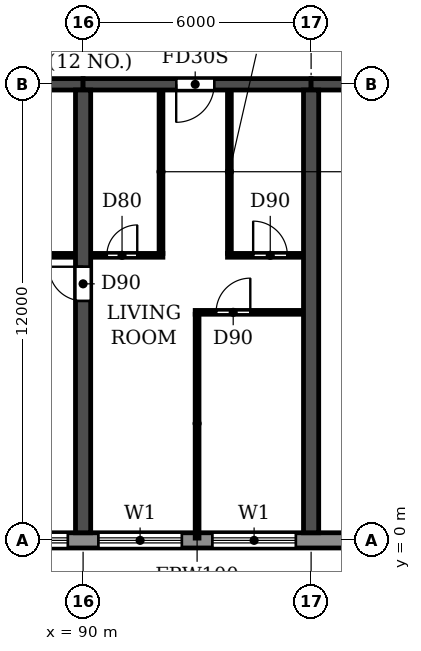
"""IFC4 building model, lengths in metres.
Left out: names, types, materials, properties, quantities, classifications, styles, units other than length and angle.
Written with IfcOpenShell. Run it as: python <this file> out.ifc"""

import sys

from ifc_helpers import new_model, si_unit, direction, frame, frame_2d, origin, place, context, subcontext, project, spatial, rectangle, extrude, element, fill, save


model = new_model("IFC4")
c1 = context("Model", 3, precision=1e-05, world=origin(), true_north=direction((0.0, 1.0)))
c2 = subcontext(c1, "Body", "Model", "MODEL_VIEW")
j1 = project(units=[si_unit("LENGTHUNIT", "METRE"), si_unit("PLANEANGLEUNIT", "RADIAN")], contexts=[c1])
p1 = place(None, origin())
s1 = spatial("IfcSite", under=j1, at=p1, CompositionType="ELEMENT")
p2 = place(p1, origin())
s2 = spatial("IfcBuilding", under=s1, at=p2, CompositionType="ELEMENT")
p3 = place(p2, frame((0.0, 0.0, 26.7)))
s3 = spatial("IfcBuildingStorey", under=s2, at=p3, CompositionType="ELEMENT", Elevation=26.7)
p4 = place(p3, frame((90.0, 0.2, 0.0), z_axis=(0.0, 0.0, 1.0), x_axis=(0.0, 1.0, 0.0)))
e1 = element("IfcWall", 1, at=p4, inside=s3, PredefinedType="SHEAR", context=c2, shape_type="SweptSolid", body=[
    extrude(rectangle(XDim=11.65, YDim=0.4, at=frame_2d((5.825, 0.0))), origin(), (0.0, 0.0, 1.0), 3.05),
])
p5 = place(p4, frame((6.1, 0.0, 0.0)))
e2 = element("IfcOpeningElement", 2, at=p5, cuts=e1, PredefinedType="OPENING", context=c2, shape_type="SweptSolid", body=[
    extrude(rectangle(XDim=0.9, YDim=2.1, at=frame_2d((0.45, 1.05))), frame((0.0, 0.21, 0.0), z_axis=(0.0, -1.0, 0.0), x_axis=(1.0, 0.0, 0.0)), (0.0, 0.0, 1.0), 0.42),
])
p6 = place(p3, frame((96.0, 0.2, 0.0), z_axis=(0.0, 0.0, 1.0), x_axis=(0.0, 1.0, 0.0)))
e3 = element("IfcWall", 3, at=p6, inside=s3, PredefinedType="SHEAR", context=c2, shape_type="SweptSolid", body=[
    extrude(rectangle(XDim=11.65, YDim=0.4, at=frame_2d((5.825, 0.0))), origin(), (0.0, 0.0, 1.0), 3.05),
])
p7 = place(p3, frame((84.0, 12.0, 0.0), z_axis=(0.0, 0.0, 1.0), x_axis=(1.0, 0.0, 0.0)))
e4 = element("IfcWall", 4, at=p7, inside=s3, PredefinedType="SHEAR", context=c2, shape_type="SweptSolid", body=[
    extrude(rectangle(XDim=6.0, YDim=0.3, at=frame_2d((3.0, 0.0))), origin(), (0.0, 0.0, 1.0), 2.45),
])
p8 = place(p3, frame((90.0, 12.0, 0.0), z_axis=(0.0, 0.0, 1.0), x_axis=(1.0, 0.0, 0.0)))
e5 = element("IfcWall", 5, at=p8, inside=s3, PredefinedType="SHEAR", context=c2, shape_type="SweptSolid", body=[
    extrude(rectangle(XDim=6.0, YDim=0.3, at=frame_2d((3.0, 0.0))), origin(), (0.0, 0.0, 1.0), 2.45),
])
p9 = place(p8, frame((2.45, 0.0, 0.0)))
e6 = element("IfcOpeningElement", 6, at=p9, cuts=e5, PredefinedType="OPENING", context=c2, shape_type="SweptSolid", body=[
    extrude(rectangle(XDim=1.0, YDim=2.1, at=frame_2d((0.5, 1.05))), frame((0.0, 0.16, 0.0), z_axis=(0.0, -1.0, 0.0), x_axis=(1.0, 0.0, 0.0)), (0.0, 0.0, 1.0), 0.32),
])
p10 = place(p3, frame((96.0, 12.0, 0.0), z_axis=(0.0, 0.0, 1.0), x_axis=(1.0, 0.0, 0.0)))
e7 = element("IfcWall", 7, at=p10, inside=s3, PredefinedType="SHEAR", context=c2, shape_type="SweptSolid", body=[
    extrude(rectangle(XDim=5.8, YDim=0.3, at=frame_2d((2.9, 0.0))), origin(), (0.0, 0.0, 1.0), 2.45),
])
p11 = place(p10, frame((2.5, 0.0, 0.0)))
e8 = element("IfcOpeningElement", 8, at=p11, cuts=e7, PredefinedType="OPENING", context=c2, shape_type="SweptSolid", body=[
    extrude(rectangle(XDim=1.0, YDim=2.1, at=frame_2d((0.5, 1.05))), frame((0.0, 0.16, 0.0), z_axis=(0.0, -1.0, 0.0), x_axis=(1.0, 0.0, 0.0)), (0.0, 0.0, 1.0), 0.32),
])
p12 = place(p3, frame((4.683, 0.0, 0.0), z_axis=(0.0, 0.0, 1.0), x_axis=(1.0, 0.0, 0.0)))
e9 = element("IfcWall", 9, at=p12, inside=s3, PredefinedType="STANDARD", context=c2, shape_type="SweptSolid", body=[
    extrude(rectangle(XDim=92.634, YDim=0.4, at=frame_2d((46.317, 0.0))), origin(), (0.0, 0.0, 1.0), 3.05),
])
p13 = place(p12, frame((1.717, 0.0, 0.9)))
e10 = element("IfcOpeningElement", 10, at=p13, cuts=e9, PredefinedType="OPENING", context=c2, shape_type="SweptSolid", body=[
    extrude(rectangle(XDim=2.2, YDim=1.5, at=frame_2d((1.1, 0.75))), frame((0.0, 0.21, 0.0), z_axis=(0.0, -1.0, 0.0), x_axis=(1.0, 0.0, 0.0)), (0.0, 0.0, 1.0), 0.42),
])
p14 = place(p12, frame((4.717, 0.0, 0.9)))
e11 = element("IfcOpeningElement", 11, at=p14, cuts=e9, PredefinedType="OPENING", context=c2, shape_type="SweptSolid", body=[
    extrude(rectangle(XDim=2.2, YDim=1.5, at=frame_2d((1.1, 0.75))), frame((0.0, 0.21, 0.0), z_axis=(0.0, -1.0, 0.0), x_axis=(1.0, 0.0, 0.0)), (0.0, 0.0, 1.0), 0.42),
])
p15 = place(p12, frame((7.717, 0.0, 0.9)))
e12 = element("IfcOpeningElement", 12, at=p15, cuts=e9, PredefinedType="OPENING", context=c2, shape_type="SweptSolid", body=[
    extrude(rectangle(XDim=2.2, YDim=1.5, at=frame_2d((1.1, 0.75))), frame((0.0, 0.21, 0.0), z_axis=(0.0, -1.0, 0.0), x_axis=(1.0, 0.0, 0.0)), (0.0, 0.0, 1.0), 0.42),
])
p16 = place(p12, frame((10.717, 0.0, 0.9)))
e13 = element("IfcOpeningElement", 13, at=p16, cuts=e9, PredefinedType="OPENING", context=c2, shape_type="SweptSolid", body=[
    extrude(rectangle(XDim=2.2, YDim=1.5, at=frame_2d((1.1, 0.75))), frame((0.0, 0.21, 0.0), z_axis=(0.0, -1.0, 0.0), x_axis=(1.0, 0.0, 0.0)), (0.0, 0.0, 1.0), 0.42),
])
p17 = place(p12, frame((13.717, 0.0, 0.9)))
e14 = element("IfcOpeningElement", 14, at=p17, cuts=e9, PredefinedType="OPENING", context=c2, shape_type="SweptSolid", body=[
    extrude(rectangle(XDim=2.2, YDim=1.5, at=frame_2d((1.1, 0.75))), frame((0.0, 0.21, 0.0), z_axis=(0.0, -1.0, 0.0), x_axis=(1.0, 0.0, 0.0)), (0.0, 0.0, 1.0), 0.42),
])
p18 = place(p12, frame((16.717, 0.0, 0.9)))
e15 = element("IfcOpeningElement", 15, at=p18, cuts=e9, PredefinedType="OPENING", context=c2, shape_type="SweptSolid", body=[
    extrude(rectangle(XDim=2.2, YDim=1.5, at=frame_2d((1.1, 0.75))), frame((0.0, 0.21, 0.0), z_axis=(0.0, -1.0, 0.0), x_axis=(1.0, 0.0, 0.0)), (0.0, 0.0, 1.0), 0.42),
])
p19 = place(p12, frame((19.917, 0.0, 0.0)))
e16 = element("IfcOpeningElement", 16, at=p19, cuts=e9, PredefinedType="OPENING", context=c2, shape_type="SweptSolid", body=[
    extrude(rectangle(XDim=1.8, YDim=2.4, at=frame_2d((0.9, 1.2))), frame((0.0, 0.21, 0.0), z_axis=(0.0, -1.0, 0.0), x_axis=(1.0, 0.0, 0.0)), (0.0, 0.0, 1.0), 0.42),
])
p20 = place(p12, frame((22.717, 0.0, 0.9)))
e17 = element("IfcOpeningElement", 17, at=p20, cuts=e9, PredefinedType="OPENING", context=c2, shape_type="SweptSolid", body=[
    extrude(rectangle(XDim=2.2, YDim=1.5, at=frame_2d((1.1, 0.75))), frame((0.0, 0.21, 0.0), z_axis=(0.0, -1.0, 0.0), x_axis=(1.0, 0.0, 0.0)), (0.0, 0.0, 1.0), 0.42),
])
p21 = place(p12, frame((25.717, 0.0, 0.9)))
e18 = element("IfcOpeningElement", 18, at=p21, cuts=e9, PredefinedType="OPENING", context=c2, shape_type="SweptSolid", body=[
    extrude(rectangle(XDim=2.2, YDim=1.5, at=frame_2d((1.1, 0.75))), frame((0.0, 0.21, 0.0), z_axis=(0.0, -1.0, 0.0), x_axis=(1.0, 0.0, 0.0)), (0.0, 0.0, 1.0), 0.42),
])
p22 = place(p12, frame((28.717, 0.0, 0.9)))
e19 = element("IfcOpeningElement", 19, at=p22, cuts=e9, PredefinedType="OPENING", context=c2, shape_type="SweptSolid", body=[
    extrude(rectangle(XDim=2.2, YDim=1.5, at=frame_2d((1.1, 0.75))), frame((0.0, 0.21, 0.0), z_axis=(0.0, -1.0, 0.0), x_axis=(1.0, 0.0, 0.0)), (0.0, 0.0, 1.0), 0.42),
])
p23 = place(p12, frame((31.917, 0.0, 0.0)))
e20 = element("IfcOpeningElement", 20, at=p23, cuts=e9, PredefinedType="OPENING", context=c2, shape_type="SweptSolid", body=[
    extrude(rectangle(XDim=1.8, YDim=2.4, at=frame_2d((0.9, 1.2))), frame((0.0, 0.21, 0.0), z_axis=(0.0, -1.0, 0.0), x_axis=(1.0, 0.0, 0.0)), (0.0, 0.0, 1.0), 0.42),
])
p24 = place(p12, frame((34.717, 0.0, 0.9)))
e21 = element("IfcOpeningElement", 21, at=p24, cuts=e9, PredefinedType="OPENING", context=c2, shape_type="SweptSolid", body=[
    extrude(rectangle(XDim=2.2, YDim=1.5, at=frame_2d((1.1, 0.75))), frame((0.0, 0.21, 0.0), z_axis=(0.0, -1.0, 0.0), x_axis=(1.0, 0.0, 0.0)), (0.0, 0.0, 1.0), 0.42),
])
p25 = place(p12, frame((37.717, 0.0, 0.9)))
e22 = element("IfcOpeningElement", 22, at=p25, cuts=e9, PredefinedType="OPENING", context=c2, shape_type="SweptSolid", body=[
    extrude(rectangle(XDim=2.2, YDim=1.5, at=frame_2d((1.1, 0.75))), frame((0.0, 0.21, 0.0), z_axis=(0.0, -1.0, 0.0), x_axis=(1.0, 0.0, 0.0)), (0.0, 0.0, 1.0), 0.42),
])
p26 = place(p12, frame((40.717, 0.0, 0.9)))
e23 = element("IfcOpeningElement", 23, at=p26, cuts=e9, PredefinedType="OPENING", context=c2, shape_type="SweptSolid", body=[
    extrude(rectangle(XDim=2.2, YDim=1.5, at=frame_2d((1.1, 0.75))), frame((0.0, 0.21, 0.0), z_axis=(0.0, -1.0, 0.0), x_axis=(1.0, 0.0, 0.0)), (0.0, 0.0, 1.0), 0.42),
])
p27 = place(p12, frame((43.917, 0.0, 0.0)))
e24 = element("IfcOpeningElement", 24, at=p27, cuts=e9, PredefinedType="OPENING", context=c2, shape_type="SweptSolid", body=[
    extrude(rectangle(XDim=1.8, YDim=2.4, at=frame_2d((0.9, 1.2))), frame((0.0, 0.21, 0.0), z_axis=(0.0, -1.0, 0.0), x_axis=(1.0, 0.0, 0.0)), (0.0, 0.0, 1.0), 0.42),
])
p28 = place(p12, frame((46.717, 0.0, 0.9)))
e25 = element("IfcOpeningElement", 25, at=p28, cuts=e9, PredefinedType="OPENING", context=c2, shape_type="SweptSolid", body=[
    extrude(rectangle(XDim=2.2, YDim=1.5, at=frame_2d((1.1, 0.75))), frame((0.0, 0.21, 0.0), z_axis=(0.0, -1.0, 0.0), x_axis=(1.0, 0.0, 0.0)), (0.0, 0.0, 1.0), 0.42),
])
p29 = place(p12, frame((49.717, 0.0, 0.9)))
e26 = element("IfcOpeningElement", 26, at=p29, cuts=e9, PredefinedType="OPENING", context=c2, shape_type="SweptSolid", body=[
    extrude(rectangle(XDim=2.2, YDim=1.5, at=frame_2d((1.1, 0.75))), frame((0.0, 0.21, 0.0), z_axis=(0.0, -1.0, 0.0), x_axis=(1.0, 0.0, 0.0)), (0.0, 0.0, 1.0), 0.42),
])
p30 = place(p12, frame((52.717, 0.0, 0.9)))
e27 = element("IfcOpeningElement", 27, at=p30, cuts=e9, PredefinedType="OPENING", context=c2, shape_type="SweptSolid", body=[
    extrude(rectangle(XDim=2.2, YDim=1.5, at=frame_2d((1.1, 0.75))), frame((0.0, 0.21, 0.0), z_axis=(0.0, -1.0, 0.0), x_axis=(1.0, 0.0, 0.0)), (0.0, 0.0, 1.0), 0.42),
])
p31 = place(p12, frame((55.717, 0.0, 0.9)))
e28 = element("IfcOpeningElement", 28, at=p31, cuts=e9, PredefinedType="OPENING", context=c2, shape_type="SweptSolid", body=[
    extrude(rectangle(XDim=2.2, YDim=1.5, at=frame_2d((1.1, 0.75))), frame((0.0, 0.21, 0.0), z_axis=(0.0, -1.0, 0.0), x_axis=(1.0, 0.0, 0.0)), (0.0, 0.0, 1.0), 0.42),
])
p32 = place(p12, frame((58.917, 0.0, 0.0)))
e29 = element("IfcOpeningElement", 29, at=p32, cuts=e9, PredefinedType="OPENING", context=c2, shape_type="SweptSolid", body=[
    extrude(rectangle(XDim=1.8, YDim=2.4, at=frame_2d((0.9, 1.2))), frame((0.0, 0.21, 0.0), z_axis=(0.0, -1.0, 0.0), x_axis=(1.0, 0.0, 0.0)), (0.0, 0.0, 1.0), 0.42),
])
p33 = place(p12, frame((61.717, 0.0, 0.9)))
e30 = element("IfcOpeningElement", 30, at=p33, cuts=e9, PredefinedType="OPENING", context=c2, shape_type="SweptSolid", body=[
    extrude(rectangle(XDim=2.2, YDim=1.5, at=frame_2d((1.1, 0.75))), frame((0.0, 0.21, 0.0), z_axis=(0.0, -1.0, 0.0), x_axis=(1.0, 0.0, 0.0)), (0.0, 0.0, 1.0), 0.42),
])
p34 = place(p12, frame((64.717, 0.0, 0.9)))
e31 = element("IfcOpeningElement", 31, at=p34, cuts=e9, PredefinedType="OPENING", context=c2, shape_type="SweptSolid", body=[
    extrude(rectangle(XDim=2.2, YDim=1.5, at=frame_2d((1.1, 0.75))), frame((0.0, 0.21, 0.0), z_axis=(0.0, -1.0, 0.0), x_axis=(1.0, 0.0, 0.0)), (0.0, 0.0, 1.0), 0.42),
])
p35 = place(p12, frame((67.717, 0.0, 0.9)))
e32 = element("IfcOpeningElement", 32, at=p35, cuts=e9, PredefinedType="OPENING", context=c2, shape_type="SweptSolid", body=[
    extrude(rectangle(XDim=2.2, YDim=1.5, at=frame_2d((1.1, 0.75))), frame((0.0, 0.21, 0.0), z_axis=(0.0, -1.0, 0.0), x_axis=(1.0, 0.0, 0.0)), (0.0, 0.0, 1.0), 0.42),
])
p36 = place(p12, frame((70.917, 0.0, 0.0)))
e33 = element("IfcOpeningElement", 33, at=p36, cuts=e9, PredefinedType="OPENING", context=c2, shape_type="SweptSolid", body=[
    extrude(rectangle(XDim=1.8, YDim=2.4, at=frame_2d((0.9, 1.2))), frame((0.0, 0.21, 0.0), z_axis=(0.0, -1.0, 0.0), x_axis=(1.0, 0.0, 0.0)), (0.0, 0.0, 1.0), 0.42),
])
p37 = place(p12, frame((73.717, 0.0, 0.9)))
e34 = element("IfcOpeningElement", 34, at=p37, cuts=e9, PredefinedType="OPENING", context=c2, shape_type="SweptSolid", body=[
    extrude(rectangle(XDim=2.2, YDim=1.5, at=frame_2d((1.1, 0.75))), frame((0.0, 0.21, 0.0), z_axis=(0.0, -1.0, 0.0), x_axis=(1.0, 0.0, 0.0)), (0.0, 0.0, 1.0), 0.42),
])
p38 = place(p12, frame((76.717, 0.0, 0.9)))
e35 = element("IfcOpeningElement", 35, at=p38, cuts=e9, PredefinedType="OPENING", context=c2, shape_type="SweptSolid", body=[
    extrude(rectangle(XDim=2.2, YDim=1.5, at=frame_2d((1.1, 0.75))), frame((0.0, 0.21, 0.0), z_axis=(0.0, -1.0, 0.0), x_axis=(1.0, 0.0, 0.0)), (0.0, 0.0, 1.0), 0.42),
])
p39 = place(p12, frame((79.717, 0.0, 0.9)))
e36 = element("IfcOpeningElement", 36, at=p39, cuts=e9, PredefinedType="OPENING", context=c2, shape_type="SweptSolid", body=[
    extrude(rectangle(XDim=2.2, YDim=1.5, at=frame_2d((1.1, 0.75))), frame((0.0, 0.21, 0.0), z_axis=(0.0, -1.0, 0.0), x_axis=(1.0, 0.0, 0.0)), (0.0, 0.0, 1.0), 0.42),
])
p40 = place(p12, frame((82.717, 0.0, 0.9)))
e37 = element("IfcOpeningElement", 37, at=p40, cuts=e9, PredefinedType="OPENING", context=c2, shape_type="SweptSolid", body=[
    extrude(rectangle(XDim=2.2, YDim=1.5, at=frame_2d((1.1, 0.75))), frame((0.0, 0.21, 0.0), z_axis=(0.0, -1.0, 0.0), x_axis=(1.0, 0.0, 0.0)), (0.0, 0.0, 1.0), 0.42),
])
p41 = place(p12, frame((85.717, 0.0, 0.9)))
e38 = element("IfcOpeningElement", 38, at=p41, cuts=e9, PredefinedType="OPENING", context=c2, shape_type="SweptSolid", body=[
    extrude(rectangle(XDim=2.2, YDim=1.5, at=frame_2d((1.1, 0.75))), frame((0.0, 0.21, 0.0), z_axis=(0.0, -1.0, 0.0), x_axis=(1.0, 0.0, 0.0)), (0.0, 0.0, 1.0), 0.42),
])
p42 = place(p12, frame((88.717, 0.0, 0.9)))
e39 = element("IfcOpeningElement", 39, at=p42, cuts=e9, PredefinedType="OPENING", context=c2, shape_type="SweptSolid", body=[
    extrude(rectangle(XDim=2.2, YDim=1.5, at=frame_2d((1.1, 0.75))), frame((0.0, 0.21, 0.0), z_axis=(0.0, -1.0, 0.0), x_axis=(1.0, 0.0, 0.0)), (0.0, 0.0, 1.0), 0.42),
])
p43 = place(p3, frame((92.95, 6.0, 0.0), z_axis=(0.0, 0.0, 1.0), x_axis=(1.0, 0.0, 0.0)))
e40 = element("IfcWall", 40, at=p43, inside=s3, PredefinedType="PARTITIONING", context=c2, shape_type="SweptSolid", body=[
    extrude(rectangle(XDim=2.84, YDim=0.1, at=frame_2d((1.42, 0.0))), origin(), (0.0, 0.0, 1.0), 3.05),
])
p44 = place(p43, frame((0.55, 0.0, 0.0)))
e41 = element("IfcOpeningElement", 41, at=p44, cuts=e40, PredefinedType="OPENING", context=c2, shape_type="SweptSolid", body=[
    extrude(rectangle(XDim=0.9, YDim=2.1, at=frame_2d((0.45, 1.05))), frame((0.0, 0.06, 0.0), z_axis=(0.0, -1.0, 0.0), x_axis=(1.0, 0.0, 0.0)), (0.0, 0.0, 1.0), 0.12),
])
p45 = place(p3, frame((87.1, 7.5, 0.0), z_axis=(0.0, 0.0, 1.0), x_axis=(1.0, 0.0, 0.0)))
e42 = element("IfcWall", 42, at=p45, inside=s3, PredefinedType="PARTITIONING", context=c2, shape_type="SweptSolid", body=[
    extrude(rectangle(XDim=2.69, YDim=0.1, at=frame_2d((1.345, 0.0))), origin(), (0.0, 0.0, 1.0), 3.05),
])
p46 = place(p45, frame((1.0, 0.0, 0.0)))
e43 = element("IfcOpeningElement", 43, at=p46, cuts=e42, PredefinedType="OPENING", context=c2, shape_type="SweptSolid", body=[
    extrude(rectangle(XDim=0.8, YDim=2.1, at=frame_2d((0.4, 1.05))), frame((0.0, 0.06, 0.0), z_axis=(0.0, -1.0, 0.0), x_axis=(1.0, 0.0, 0.0)), (0.0, 0.0, 1.0), 0.12),
])
p47 = place(p3, frame((90.21, 7.5, 0.0), z_axis=(0.0, 0.0, 1.0), x_axis=(1.0, 0.0, 0.0)))
e44 = element("IfcWall", 44, at=p47, inside=s3, PredefinedType="PARTITIONING", context=c2, shape_type="SweptSolid", body=[
    extrude(rectangle(XDim=1.89, YDim=0.1, at=frame_2d((0.945, 0.0))), origin(), (0.0, 0.0, 1.0), 3.05),
])
p48 = place(p47, frame((0.415, 0.0, 0.0)))
e45 = element("IfcOpeningElement", 45, at=p48, cuts=e44, PredefinedType="OPENING", context=c2, shape_type="SweptSolid", body=[
    extrude(rectangle(XDim=0.8, YDim=2.1, at=frame_2d((0.4, 1.05))), frame((0.0, 0.06, 0.0), z_axis=(0.0, -1.0, 0.0), x_axis=(1.0, 0.0, 0.0)), (0.0, 0.0, 1.0), 0.12),
])
p49 = place(p3, frame((93.8, 7.5, 0.0), z_axis=(0.0, 0.0, 1.0), x_axis=(1.0, 0.0, 0.0)))
e46 = element("IfcWall", 46, at=p49, inside=s3, PredefinedType="PARTITIONING", context=c2, shape_type="SweptSolid", body=[
    extrude(rectangle(XDim=1.99, YDim=0.1, at=frame_2d((0.995, 0.0))), origin(), (0.0, 0.0, 1.0), 3.05),
])
p50 = place(p49, frame((0.675, 0.0, 0.0)))
e47 = element("IfcOpeningElement", 47, at=p50, cuts=e46, PredefinedType="OPENING", context=c2, shape_type="SweptSolid", body=[
    extrude(rectangle(XDim=0.9, YDim=2.1, at=frame_2d((0.45, 1.05))), frame((0.0, 0.06, 0.0), z_axis=(0.0, -1.0, 0.0), x_axis=(1.0, 0.0, 0.0)), (0.0, 0.0, 1.0), 0.12),
])
p51 = place(p3, frame((92.05, 7.55, 0.0), z_axis=(0.0, 0.0, 1.0), x_axis=(0.0, 1.0, 0.0)))
e48 = element("IfcWall", 48, at=p51, inside=s3, PredefinedType="PARTITIONING", context=c2, shape_type="SweptSolid", body=[
    extrude(rectangle(XDim=4.29, YDim=0.1, at=frame_2d((2.145, 0.0))), origin(), (0.0, 0.0, 1.0), 3.05),
])
p52 = place(p3, frame((93.0, 0.06, 0.0), z_axis=(0.0, 0.0, 1.0), x_axis=(0.0, 1.0, 0.0)))
e49 = element("IfcWall", 49, at=p52, inside=s3, PredefinedType="PARTITIONING", context=c2, shape_type="SweptSolid", body=[
    extrude(rectangle(XDim=5.89, YDim=0.1, at=frame_2d((2.945, 0.0))), origin(), (0.0, 0.0, 1.0), 3.05),
])
p53 = place(p3, frame((93.85, 7.55, 0.0), z_axis=(0.0, 0.0, 1.0), x_axis=(0.0, 1.0, 0.0)))
e50 = element("IfcWall", 50, at=p53, inside=s3, PredefinedType="PARTITIONING", context=c2, shape_type="SweptSolid", body=[
    extrude(rectangle(XDim=4.29, YDim=0.1, at=frame_2d((2.145, 0.0))), origin(), (0.0, 0.0, 1.0), 3.05),
])
p54 = place(p40, origin())
e51 = element("IfcWindow", 51, at=p54, inside=s3, PartitioningType="DOUBLE_PANEL_HORIZONTAL", PredefinedType="WINDOW", context=c2, shape_type="SweptSolid", body=[
    extrude(rectangle(XDim=2.2, YDim=1.5, at=frame_2d((1.1, 0.75))), frame((0.0, 0.03, 0.0), z_axis=(0.0, -1.0, 0.0), x_axis=(1.0, 0.0, 0.0)), (0.0, 0.0, 1.0), 0.06),
])
fill(e37, e51)
p55 = place(p41, origin())
e52 = element("IfcWindow", 52, at=p55, inside=s3, PartitioningType="DOUBLE_PANEL_HORIZONTAL", PredefinedType="WINDOW", context=c2, shape_type="SweptSolid", body=[
    extrude(rectangle(XDim=2.2, YDim=1.5, at=frame_2d((1.1, 0.75))), frame((0.0, 0.03, 0.0), z_axis=(0.0, -1.0, 0.0), x_axis=(1.0, 0.0, 0.0)), (0.0, 0.0, 1.0), 0.06),
])
fill(e38, e52)
p56 = place(p42, origin())
e53 = element("IfcWindow", 53, at=p56, inside=s3, PartitioningType="DOUBLE_PANEL_HORIZONTAL", PredefinedType="WINDOW", context=c2, shape_type="SweptSolid", body=[
    extrude(rectangle(XDim=2.2, YDim=1.5, at=frame_2d((1.1, 0.75))), frame((0.0, 0.03, 0.0), z_axis=(0.0, -1.0, 0.0), x_axis=(1.0, 0.0, 0.0)), (0.0, 0.0, 1.0), 0.06),
])
fill(e39, e53)
p57 = place(p5, origin())
e54 = element("IfcDoor", 54, at=p57, inside=s3, OperationType="SINGLE_SWING_RIGHT", PredefinedType="DOOR", context=c2, shape_type="SweptSolid", body=[
    extrude(rectangle(XDim=0.9, YDim=2.1, at=frame_2d((0.45, 1.05))), frame((0.0, 0.025, 0.0), z_axis=(0.0, -1.0, 0.0), x_axis=(1.0, 0.0, 0.0)), (0.0, 0.0, 1.0), 0.05),
])
fill(e2, e54)
p58 = place(p48, origin())
e55 = element("IfcDoor", 55, at=p58, inside=s3, OperationType="SINGLE_SWING_RIGHT", PredefinedType="DOOR", context=c2, shape_type="SweptSolid", body=[
    extrude(rectangle(XDim=0.8, YDim=2.1, at=frame_2d((0.4, 1.05))), frame((0.0, 0.025, 0.0), z_axis=(0.0, -1.0, 0.0), x_axis=(1.0, 0.0, 0.0)), (0.0, 0.0, 1.0), 0.05),
])
fill(e45, e55)
p59 = place(p9, frame((1.0, 0.0, 0.0), z_axis=(0.0, 0.0, 1.0), x_axis=(-1.0, 0.0, 0.0)))
e56 = element("IfcDoor", 56, at=p59, inside=s3, OperationType="SINGLE_SWING_RIGHT", PredefinedType="DOOR", context=c2, shape_type="SweptSolid", body=[
    extrude(rectangle(XDim=1.0, YDim=2.1, at=frame_2d((0.5, 1.05))), frame((0.0, 0.025, 0.0), z_axis=(0.0, -1.0, 0.0), x_axis=(1.0, 0.0, 0.0)), (0.0, 0.0, 1.0), 0.05),
])
fill(e6, e56)
p60 = place(p44, origin())
e57 = element("IfcDoor", 57, at=p60, inside=s3, OperationType="SINGLE_SWING_RIGHT", PredefinedType="DOOR", context=c2, shape_type="SweptSolid", body=[
    extrude(rectangle(XDim=0.9, YDim=2.1, at=frame_2d((0.45, 1.05))), frame((0.0, 0.025, 0.0), z_axis=(0.0, -1.0, 0.0), x_axis=(1.0, 0.0, 0.0)), (0.0, 0.0, 1.0), 0.05),
])
fill(e41, e57)
p61 = place(p50, origin())
e58 = element("IfcDoor", 58, at=p61, inside=s3, OperationType="SINGLE_SWING_LEFT", PredefinedType="DOOR", context=c2, shape_type="SweptSolid", body=[
    extrude(rectangle(XDim=0.9, YDim=2.1, at=frame_2d((0.45, 1.05))), frame((0.0, 0.025, 0.0), z_axis=(0.0, -1.0, 0.0), x_axis=(1.0, 0.0, 0.0)), (0.0, 0.0, 1.0), 0.05),
])
fill(e47, e58)
save(model, sys.argv[1])
